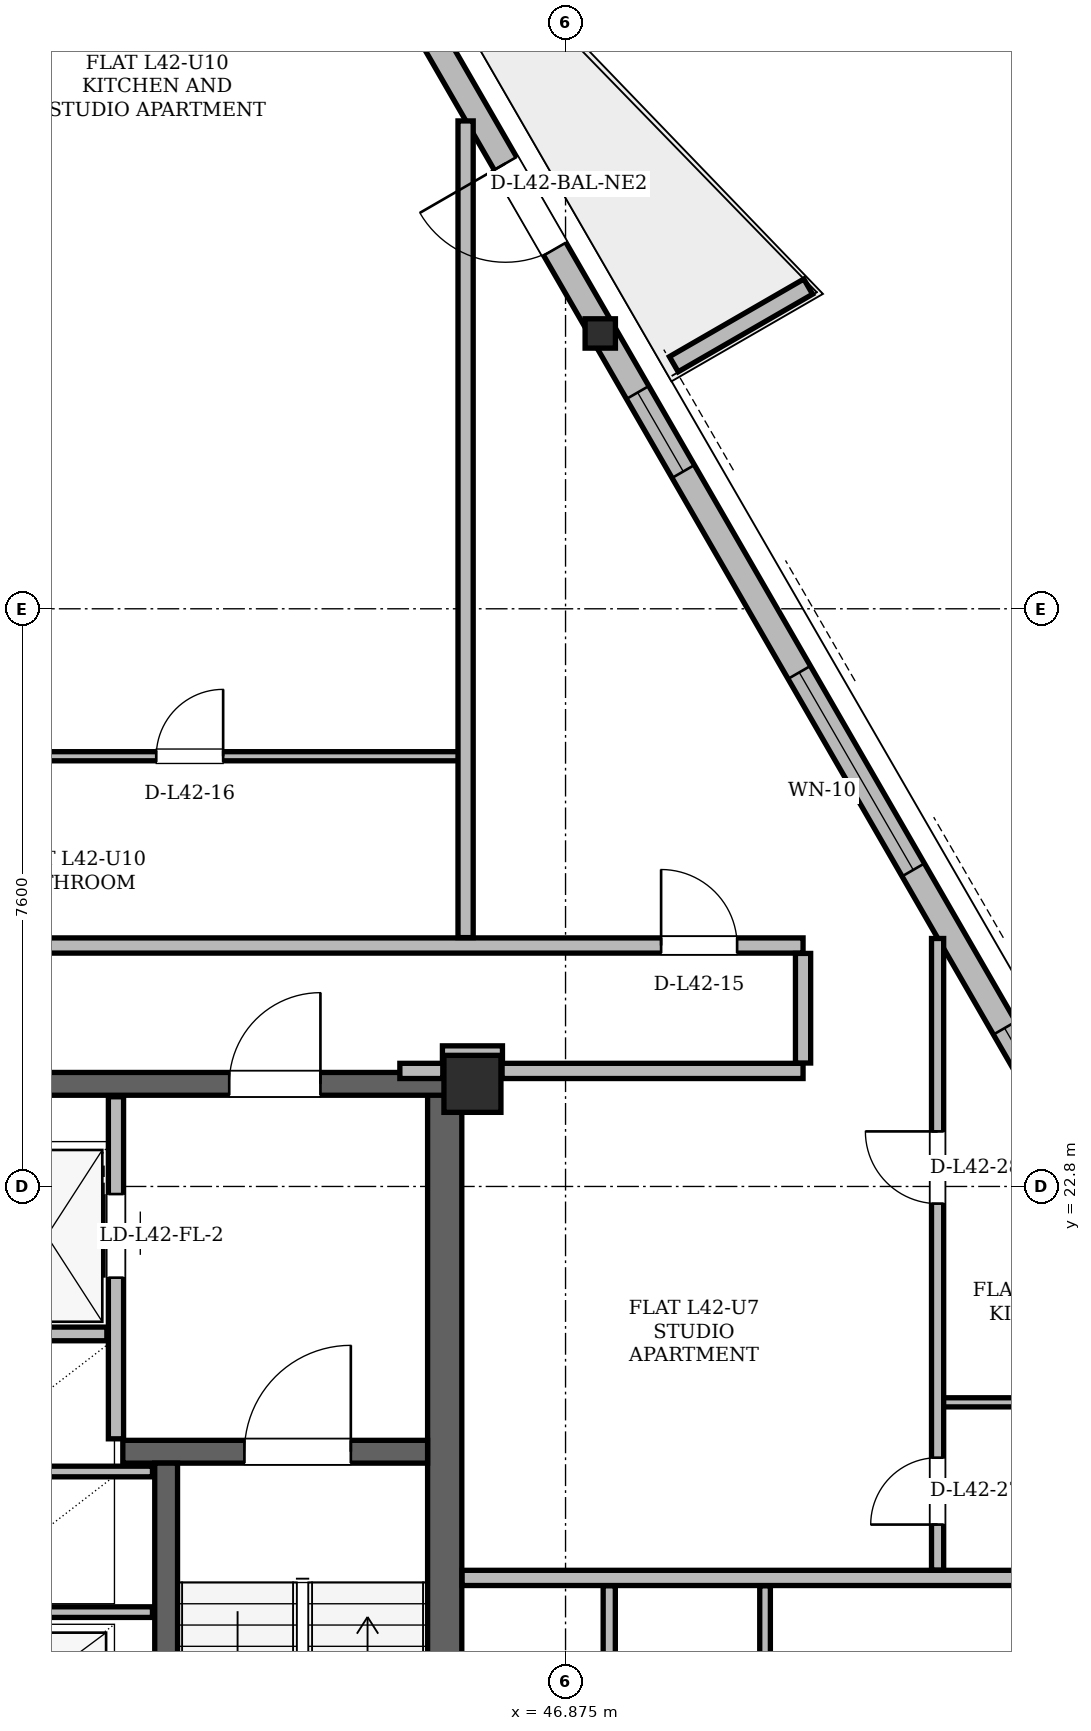
"""IFC4 building model, lengths in metres.
Left out: names, types, materials, properties, quantities, classifications, styles, units other than length and angle.
Written with IfcOpenShell. Run it as: python <this file> out.ifc"""

import sys

from ifc_helpers import new_model, si_unit, direction, frame, frame_2d, origin, origin_2d, place, context, subcontext, project, spatial, polyline, rectangle, hollow_rectangle, i_section, outline, extrude, element, fill, save


model = new_model("IFC4")
c1 = context("Model", 3, precision=1e-05, world=origin(), true_north=direction((0.0, 1.0)))
c2 = subcontext(c1, "Body", "Model", "MODEL_VIEW")
j1 = project(units=[si_unit("LENGTHUNIT", "METRE"), si_unit("PLANEANGLEUNIT", "RADIAN")], contexts=[c1])
p1 = place(None, origin())
s1 = spatial("IfcSite", under=j1, at=p1, CompositionType="ELEMENT")
p2 = place(p1, origin())
s2 = spatial("IfcBuilding", under=s1, at=p2, CompositionType="ELEMENT")
p3 = place(p2, frame((0.0, 0.0, 160.2)))
s3 = spatial("IfcBuildingStorey", under=s2, at=p3, CompositionType="ELEMENT", Elevation=160.2)
p4 = place(p3, frame((45.65, 24.15, 0.0), z_axis=(0.0, 0.0, 1.0), x_axis=(1.0, 0.0, 0.0)))
e1 = element("IfcColumn", 1, at=p4, inside=s3, PredefinedType="COLUMN", context=c2, shape_type="SweptSolid", body=[
    extrude(hollow_rectangle(XDim=0.75, YDim=0.75, WallThickness=0.06, at=origin_2d()), origin(), (0.0, 0.0, 1.0), 3.6),
])
p5 = place(p3, frame((47.368, 34.035, 0.005), z_axis=(-0.019984590736, -0.00734127823, 0.999773335195), x_axis=(0.34481746268, -0.938669759517, 0.0)))
e2 = element("IfcColumn", 2, at=p5, inside=s3, PredefinedType="COLUMN", context=c2, shape_type="SweptSolid", body=[
    extrude(i_section(OverallWidth=0.399, OverallDepth=0.386, WebThickness=0.021, FlangeThickness=0.033, at=origin_2d()), origin(), (0.0, 0.0, 1.0), 3.592),
])
p6 = place(p3, frame((45.285, 11.0, 0.0), z_axis=(0.0, 0.0, 1.0), x_axis=(0.0, 1.0, 0.0)))
e3 = element("IfcWall", 3, at=p6, inside=s3, PredefinedType="SHEAR", context=c2, shape_type="SweptSolid", body=[
    extrude(rectangle(XDim=13.3, YDim=0.45, at=frame_2d((6.65, 0.0))), origin(), (0.0, 0.0, 1.0), 3.38),
])
p7 = place(p3, frame((29.65, 24.15, 0.0), z_axis=(0.0, 0.0, 1.0), x_axis=(1.0, 0.0, 0.0)))
e4 = element("IfcWall", 4, at=p7, inside=s3, PredefinedType="SHEAR", context=c2, shape_type="SweptSolid", body=[
    extrude(rectangle(XDim=15.7, YDim=0.3, at=frame_2d((7.85, 0.0))), origin(), (0.0, 0.0, 1.0), 3.38),
])
p8 = place(p7, frame((1.7, 0.0, 0.0)))
e5 = element("IfcOpeningElement", 5, at=p8, cuts=e4, PredefinedType="OPENING", context=c2, shape_type="SweptSolid", body=[
    extrude(rectangle(XDim=1.2, YDim=2.2, at=frame_2d((0.6, 1.1))), frame((0.0, 0.15, 0.0), z_axis=(0.0, -1.0, 0.0), x_axis=(1.0, 0.0, 0.0)), (0.0, 0.0, 1.0), 0.3),
])
p9 = place(p7, frame((12.8, 0.0, 0.0)))
e6 = element("IfcOpeningElement", 6, at=p9, cuts=e4, PredefinedType="OPENING", context=c2, shape_type="SweptSolid", body=[
    extrude(rectangle(XDim=1.2, YDim=2.2, at=frame_2d((0.6, 1.1))), frame((0.0, 0.15, 0.0), z_axis=(0.0, -1.0, 0.0), x_axis=(1.0, 0.0, 0.0)), (0.0, 0.0, 1.0), 0.3),
])
p10 = place(p7, frame((6.55, 0.0, 0.0)))
e7 = element("IfcOpeningElement", 7, at=p10, cuts=e4, PredefinedType="OPENING", context=c2, shape_type="SweptSolid", body=[
    extrude(rectangle(XDim=0.9, YDim=2.05, at=frame_2d((0.45, 1.025))), frame((0.0, 0.15, 0.0), z_axis=(0.0, -1.0, 0.0), x_axis=(1.0, 0.0, 0.0)), (0.0, 0.0, 1.0), 0.3),
])
p11 = place(p7, frame((8.45, 0.0, 0.0)))
e8 = element("IfcOpeningElement", 8, at=p11, cuts=e4, PredefinedType="OPENING", context=c2, shape_type="SweptSolid", body=[
    extrude(rectangle(XDim=0.9, YDim=2.05, at=frame_2d((0.45, 1.025))), frame((0.0, 0.15, 0.0), z_axis=(0.0, -1.0, 0.0), x_axis=(1.0, 0.0, 0.0)), (0.0, 0.0, 1.0), 0.3),
])
p12 = place(p3, frame((41.05, 19.31, 0.0), z_axis=(0.0, 0.0, 1.0), x_axis=(1.0, 0.0, 0.0)))
e9 = element("IfcWall", 9, at=p12, inside=s3, PredefinedType="SHEAR", context=c2, shape_type="SweptSolid", body=[
    extrude(rectangle(XDim=4.01, YDim=0.3, at=frame_2d((2.005, 0.0))), origin(), (0.0, 0.0, 1.0), 3.38),
])
p13 = place(p12, frame((1.6, 0.0, 0.0)))
e10 = element("IfcOpeningElement", 10, at=p13, cuts=e9, PredefinedType="OPENING", context=c2, shape_type="SweptSolid", body=[
    extrude(rectangle(XDim=1.4, YDim=2.2, at=frame_2d((0.7, 1.1))), frame((0.0, 0.15, 0.0), z_axis=(0.0, -1.0, 0.0), x_axis=(1.0, 0.0, 0.0)), (0.0, 0.0, 1.0), 0.3),
])
p14 = place(p3, frame((41.62, 11.54, 0.0), z_axis=(0.0, 0.0, 1.0), x_axis=(0.0, 1.0, 0.0)))
e11 = element("IfcWall", 11, at=p14, inside=s3, PredefinedType="SHEAR", context=c2, shape_type="SweptSolid", body=[
    extrude(rectangle(XDim=7.62, YDim=0.3, at=frame_2d((3.81, 0.0))), origin(), (0.0, 0.0, 1.0), 3.38),
])
p15 = place(p3, frame((59.853, 12.41, 0.0), z_axis=(0.0, 0.0, 1.0), x_axis=(-0.499995364632, 0.866028079999, 0.0)))
e12 = element("IfcWall", 12, at=p15, inside=s3, PredefinedType="SOLIDWALL", context=c2, shape_type="SweptSolid", body=[
    extrude(rectangle(XDim=35.673, YDim=0.34, at=frame_2d((17.836, 0.0))), origin(), (0.0, 0.0, 1.0), 2.6),
])
p16 = place(p15, frame((6.579, 0.0, 0.0)))
e13 = element("IfcOpeningElement", 13, at=p16, cuts=e12, PredefinedType="OPENING", context=c2, shape_type="SweptSolid", body=[
    extrude(rectangle(XDim=1.5, YDim=2.2, at=frame_2d((0.75, 1.1))), frame((0.0, 0.17, 0.0), z_axis=(0.0, -1.0, 0.0), x_axis=(1.0, 0.0, 0.0)), (0.0, 0.0, 1.0), 0.34),
])
p17 = place(p15, frame((26.238, 0.0, 0.0)))
e14 = element("IfcOpeningElement", 14, at=p17, cuts=e12, PredefinedType="OPENING", context=c2, shape_type="SweptSolid", body=[
    extrude(rectangle(XDim=1.3, YDim=2.2, at=frame_2d((0.65, 1.1))), frame((0.0, 0.17, 0.0), z_axis=(0.0, -1.0, 0.0), x_axis=(1.0, 0.0, 0.0)), (0.0, 0.0, 1.0), 0.34),
])
p18 = place(p15, frame((0.99, 0.0, 0.85)))
e15 = element("IfcOpeningElement", 15, at=p18, cuts=e12, PredefinedType="OPENING", context=c2, shape_type="SweptSolid", body=[
    extrude(rectangle(XDim=1.2, YDim=1.48, at=frame_2d((0.6, 0.74))), frame((0.0, 0.17, 0.0), z_axis=(0.0, -1.0, 0.0), x_axis=(1.0, 0.0, 0.0)), (0.0, 0.0, 1.0), 0.34),
])
p19 = place(p15, frame((2.449, 0.0, 0.85)))
e16 = element("IfcOpeningElement", 16, at=p19, cuts=e12, PredefinedType="OPENING", context=c2, shape_type="SweptSolid", body=[
    extrude(rectangle(XDim=1.2, YDim=1.48, at=frame_2d((0.6, 0.74))), frame((0.0, 0.17, 0.0), z_axis=(0.0, -1.0, 0.0), x_axis=(1.0, 0.0, 0.0)), (0.0, 0.0, 1.0), 0.34),
])
p20 = place(p15, frame((16.807, 0.0, 0.85)))
e17 = element("IfcOpeningElement", 17, at=p20, cuts=e12, PredefinedType="OPENING", context=c2, shape_type="SweptSolid", body=[
    extrude(rectangle(XDim=3.0, YDim=1.64, at=frame_2d((1.5, 0.82))), frame((0.0, 0.17, 0.0), z_axis=(0.0, -1.0, 0.0), x_axis=(1.0, 0.0, 0.0)), (0.0, 0.0, 1.0), 0.34),
])
p21 = place(p15, frame((22.859, 0.0, 0.85)))
e18 = element("IfcOpeningElement", 18, at=p21, cuts=e12, PredefinedType="OPENING", context=c2, shape_type="SweptSolid", body=[
    extrude(rectangle(XDim=1.2, YDim=1.48, at=frame_2d((0.6, 0.74))), frame((0.0, 0.17, 0.0), z_axis=(0.0, -1.0, 0.0), x_axis=(1.0, 0.0, 0.0)), (0.0, 0.0, 1.0), 0.34),
])
p22 = place(p15, frame((13.203, 0.0, 0.85)))
e19 = element("IfcOpeningElement", 19, at=p22, cuts=e12, PredefinedType="OPENING", context=c2, shape_type="SweptSolid", body=[
    extrude(rectangle(XDim=1.2, YDim=1.48, at=frame_2d((0.6, 0.74))), frame((0.0, 0.17, 0.0), z_axis=(0.0, -1.0, 0.0), x_axis=(1.0, 0.0, 0.0)), (0.0, 0.0, 1.0), 0.34),
])
p23 = place(p15, frame((31.37, 0.0, 0.85)))
e20 = element("IfcOpeningElement", 20, at=p23, cuts=e12, PredefinedType="OPENING", context=c2, shape_type="SweptSolid", body=[
    extrude(rectangle(XDim=3.0, YDim=1.64, at=frame_2d((1.5, 0.82))), frame((0.0, 0.17, 0.0), z_axis=(0.0, -1.0, 0.0), x_axis=(1.0, 0.0, 0.0)), (0.0, 0.0, 1.0), 0.34),
])
p24 = place(p3, frame((48.299, 33.618, 0.0), z_axis=(0.0, 0.0, 1.0), x_axis=(0.866042246008, 0.499970827278, 0.0)))
e21 = element("IfcWall", 21, at=p24, inside=s3, PredefinedType="PARAPET", context=c2, shape_type="SweptSolid", body=[
    extrude(outline(polyline([(0.0, 0.0), (2.042, 0.0), (2.042, 1.1), (0.0, 1.32), (0.0, 0.0)])), frame((0.0, 0.115, 0.0), z_axis=(0.0, -1.0, 0.0), x_axis=(1.0, 0.0, 0.0)), (0.0, 0.0, 1.0), 0.23),
])
p25 = place(p3, frame((40.96, 19.48, 0.0), z_axis=(0.0, 0.0, 1.0), x_axis=(0.0, 1.0, 0.0)))
e22 = element("IfcWall", 22, at=p25, inside=s3, PredefinedType="PARTITIONING", context=c2, shape_type="SweptSolid", body=[
    extrude(rectangle(XDim=4.5, YDim=0.2, at=frame_2d((2.25, 0.0))), origin(), (0.0, 0.0, 1.0), 2.42),
])
p26 = place(p25, frame((2.12, 0.0, 0.0)))
e23 = element("IfcOpeningElement", 23, at=p26, cuts=e22, PredefinedType="OPENING", context=c2, shape_type="SweptSolid", body=[
    extrude(rectangle(XDim=1.1, YDim=2.2, at=frame_2d((0.55, 1.1))), frame((0.0, 0.1, 0.0), z_axis=(0.0, -1.0, 0.0), x_axis=(1.0, 0.0, 0.0)), (0.0, 0.0, 1.0), 0.2),
])
p27 = place(p3, frame((39.26, 20.86, 0.0), z_axis=(0.0, 0.0, 1.0), x_axis=(1.0, 0.0, 0.0)))
e24 = element("IfcWall", 24, at=p27, inside=s3, PredefinedType="PARTITIONING", context=c2, shape_type="SweptSolid", body=[
    extrude(rectangle(XDim=1.58, YDim=0.18, at=frame_2d((0.79, 0.0))), origin(), (0.0, 0.0, 1.0), 3.38),
])
for number, where, z_axis, x_axis in (
    (25, (38.78, 17.2, 0.0), (0.0, 0.0, 1.0), (1.0, 0.0, 0.0)),
    (26, (38.78, 19.05, 0.0), (0.0, 0.0, 1.0), (1.0, 0.0, 0.0)),
):
    element("IfcWall", number, at=place(p3, frame(where, z_axis=z_axis, x_axis=x_axis)), inside=s3, PredefinedType="PARTITIONING", context=c2, shape_type="SweptSolid", body=[
        extrude(rectangle(XDim=2.66, YDim=0.14, at=frame_2d((1.33, 0.0))), origin(), (0.0, 0.0, 1.0), 3.38),
    ])
p28 = place(p3, frame((45.514, 17.65, 0.0), z_axis=(0.0, 0.0, 1.0), x_axis=(1.0, 0.0, 0.0)))
e27 = element("IfcWall", 27, at=p28, inside=s3, PredefinedType="PARTITIONING", context=c2, shape_type="SweptSolid", body=[
    extrude(rectangle(XDim=11.113, YDim=0.2, at=frame_2d((5.557, 0.0))), origin(), (0.0, 0.0, 1.0), 2.42),
])
p29 = place(p3, frame((51.773, 19.96, 0.0), z_axis=(0.0, 0.0, 1.0), x_axis=(1.0, 0.0, 0.0)))
e28 = element("IfcWall", 28, at=p29, inside=s3, PredefinedType="PARTITIONING", context=c2, shape_type="SweptSolid", body=[
    extrude(rectangle(XDim=3.52, YDim=0.12, at=frame_2d((1.76, 0.0))), origin(), (0.0, 0.0, 1.0), 3.38),
])
p30 = place(p3, frame((44.695, 24.32, 0.0), z_axis=(0.0, 0.0, 1.0), x_axis=(1.0, 0.0, 0.0)))
e29 = element("IfcWall", 29, at=p30, inside=s3, PredefinedType="PARTITIONING", context=c2, shape_type="SweptSolid", body=[
    extrude(rectangle(XDim=0.565, YDim=0.2, at=frame_2d((0.282, 0.0))), origin(), (0.0, 0.0, 1.0), 2.42),
])
p31 = place(p3, frame((46.04, 24.32, 0.0), z_axis=(0.0, 0.0, 1.0), x_axis=(1.0, 0.0, 0.0)))
e30 = element("IfcWall", 30, at=p31, inside=s3, PredefinedType="PARTITIONING", context=c2, shape_type="SweptSolid", body=[
    extrude(rectangle(XDim=3.96, YDim=0.2, at=frame_2d((1.98, 0.0))), origin(), (0.0, 0.0, 1.0), 3.38),
])
p32 = place(p3, frame((45.255, 24.55, 0.0), z_axis=(0.0, 0.0, 1.0), x_axis=(1.0, 0.0, 0.0)))
e31 = element("IfcWall", 31, at=p32, inside=s3, PredefinedType="PARTITIONING", context=c2, shape_type="SweptSolid", body=[
    extrude(rectangle(XDim=0.79, YDim=0.2, at=frame_2d((0.395, 0.0))), origin(), (0.0, 0.0, 1.0), 2.842),
])
p33 = place(p3, frame((38.3, 25.97, 0.0), z_axis=(0.0, 0.0, 1.0), x_axis=(1.0, 0.0, 0.0)))
e32 = element("IfcWall", 32, at=p33, inside=s3, PredefinedType="PARTITIONING", context=c2, shape_type="SweptSolid", body=[
    extrude(rectangle(XDim=11.7, YDim=0.2, at=frame_2d((5.85, 0.0))), origin(), (0.0, 0.0, 1.0), 2.842),
])
p34 = place(p33, frame((9.832, 0.0, 0.0)))
e33 = element("IfcOpeningElement", 33, at=p34, cuts=e32, PredefinedType="OPENING", context=c2, shape_type="SweptSolid", body=[
    extrude(rectangle(XDim=1.0, YDim=2.18, at=frame_2d((0.5, 1.09))), frame((0.0, 0.1, 0.0), z_axis=(0.0, -1.0, 0.0), x_axis=(1.0, 0.0, 0.0)), (0.0, 0.0, 1.0), 0.2),
])
p35 = place(p3, frame((38.218, 28.46, 0.0), z_axis=(0.0, 0.0, 1.0), x_axis=(1.0, 0.0, 0.0)))
e34 = element("IfcWall", 34, at=p35, inside=s3, PredefinedType="PARTITIONING", context=c2, shape_type="SweptSolid", body=[
    extrude(rectangle(XDim=7.424, YDim=0.12, at=frame_2d((3.712, 0.0))), origin(), (0.0, 0.0, 1.0), 3.38),
])
p36 = place(p35, frame((3.272, 0.0, 0.0)))
e35 = element("IfcOpeningElement", 35, at=p36, cuts=e34, PredefinedType="OPENING", context=c2, shape_type="SweptSolid", body=[
    extrude(rectangle(XDim=0.88, YDim=2.08, at=frame_2d((0.44, 1.04))), frame((0.0, 0.06, 0.0), z_axis=(0.0, -1.0, 0.0), x_axis=(1.0, 0.0, 0.0)), (0.0, 0.0, 1.0), 0.12),
])
p37 = place(p3, frame((45.56, 26.074, 0.0), z_axis=(0.0, 0.0, 1.0), x_axis=(0.0, 1.0, 0.0)))
e36 = element("IfcWall", 36, at=p37, inside=s3, PredefinedType="PARTITIONING", context=c2, shape_type="SweptSolid", body=[
    extrude(rectangle(XDim=10.744, YDim=0.2, at=frame_2d((5.372, 0.0))), origin(), (0.0, 0.0, 1.0), 3.38),
])
p38 = place(p3, frame((47.45, 13.074, 0.0), z_axis=(0.0, 0.0, 1.0), x_axis=(0.0, 1.0, 0.0)))
e37 = element("IfcWall", 37, at=p38, inside=s3, PredefinedType="PARTITIONING", context=c2, shape_type="SweptSolid", body=[
    extrude(rectangle(XDim=4.472, YDim=0.16, at=frame_2d((2.236, 0.0))), origin(), (0.0, 0.0, 1.0), 3.38),
])
p39 = place(p3, frame((49.5, 13.074, 0.0), z_axis=(0.0, 0.0, 1.0), x_axis=(0.0, 1.0, 0.0)))
e38 = element("IfcWall", 38, at=p39, inside=s3, PredefinedType="PARTITIONING", context=c2, shape_type="SweptSolid", body=[
    extrude(rectangle(XDim=4.472, YDim=0.14, at=frame_2d((2.236, 0.0))), origin(), (0.0, 0.0, 1.0), 3.38),
])
p40 = place(p3, frame((50.0, 24.424, 0.0), z_axis=(0.0, 0.0, 1.0), x_axis=(0.0, 1.0, 0.0)))
e39 = element("IfcWall", 39, at=p40, inside=s3, PredefinedType="PARTITIONING", context=c2, shape_type="SweptSolid", body=[
    extrude(rectangle(XDim=1.442, YDim=0.2, at=frame_2d((0.721, 0.0))), origin(), (0.0, 0.0, 1.0), 3.38),
])
p41 = place(p3, frame((51.77, 17.754, 0.0), z_axis=(0.0, 0.0, 1.0), x_axis=(0.0, 1.0, 0.0)))
e40 = element("IfcWall", 40, at=p41, inside=s3, PredefinedType="PARTITIONING", context=c2, shape_type="SweptSolid", body=[
    extrude(rectangle(XDim=8.308, YDim=0.16, at=frame_2d((4.154, 0.0))), origin(), (0.0, 0.0, 1.0), 3.38),
])
p42 = place(p41, frame((0.598, 0.0, 0.0)))
e41 = element("IfcOpeningElement", 41, at=p42, cuts=e40, PredefinedType="OPENING", context=c2, shape_type="SweptSolid", body=[
    extrude(rectangle(XDim=0.88, YDim=2.08, at=frame_2d((0.44, 1.04))), frame((0.0, 0.08, 0.0), z_axis=(0.0, -1.0, 0.0), x_axis=(1.0, 0.0, 0.0)), (0.0, 0.0, 1.0), 0.16),
])
p43 = place(p41, frame((4.82, 0.0, 0.0)))
e42 = element("IfcOpeningElement", 42, at=p43, cuts=e40, PredefinedType="OPENING", context=c2, shape_type="SweptSolid", body=[
    extrude(rectangle(XDim=0.95, YDim=2.1, at=frame_2d((0.475, 1.05))), frame((0.0, 0.08, 0.0), z_axis=(0.0, -1.0, 0.0), x_axis=(1.0, 0.0, 0.0)), (0.0, 0.0, 1.0), 0.16),
])
p44 = place(p17, origin())
e43 = element("IfcDoor", 43, at=p44, inside=s3, OperationType="SINGLE_SWING_RIGHT", PredefinedType="DOOR", context=c2, shape_type="SweptSolid", body=[
    extrude(rectangle(XDim=1.3, YDim=2.2, at=frame_2d((0.65, 1.1))), frame((0.0, 0.025, 0.0), z_axis=(0.0, -1.0, 0.0), x_axis=(1.0, 0.0, 0.0)), (0.0, 0.0, 1.0), 0.05),
])
fill(e14, e43)
p45 = place(p20, origin())
e44 = element("IfcWindow", 44, at=p45, inside=s3, PartitioningType="SINGLE_PANEL", PredefinedType="WINDOW", context=c2, shape_type="SweptSolid", body=[
    extrude(rectangle(XDim=3.0, YDim=1.64, at=frame_2d((1.5, 0.82))), frame((0.0, 0.03, 0.0), z_axis=(0.0, -1.0, 0.0), x_axis=(1.0, 0.0, 0.0)), (0.0, 0.0, 1.0), 0.06),
])
fill(e17, e44)
p46 = place(p21, origin())
e45 = element("IfcWindow", 45, at=p46, inside=s3, PartitioningType="SINGLE_PANEL", PredefinedType="WINDOW", context=c2, shape_type="SweptSolid", body=[
    extrude(rectangle(XDim=1.2, YDim=1.48, at=frame_2d((0.6, 0.74))), frame((0.0, 0.03, 0.0), z_axis=(0.0, -1.0, 0.0), x_axis=(1.0, 0.0, 0.0)), (0.0, 0.0, 1.0), 0.06),
])
fill(e18, e45)
p47 = place(p22, origin())
e46 = element("IfcWindow", 46, at=p47, inside=s3, PartitioningType="SINGLE_PANEL", PredefinedType="WINDOW", context=c2, shape_type="SweptSolid", body=[
    extrude(rectangle(XDim=1.2, YDim=1.48, at=frame_2d((0.6, 0.74))), frame((0.0, 0.03, 0.0), z_axis=(0.0, -1.0, 0.0), x_axis=(1.0, 0.0, 0.0)), (0.0, 0.0, 1.0), 0.06),
])
fill(e19, e46)
p48 = place(p26, origin())
e47 = element("IfcDoor", 47, at=p48, inside=s3, OperationType="SLIDING_TO_RIGHT", PredefinedType="DOOR", context=c2, shape_type="SweptSolid", body=[
    extrude(rectangle(XDim=1.1, YDim=2.2, at=frame_2d((0.55, 1.1))), frame((0.0, 0.025, 0.0), z_axis=(0.0, -1.0, 0.0), x_axis=(1.0, 0.0, 0.0)), (0.0, 0.0, 1.0), 0.05),
])
fill(e23, e47)
p49 = place(p13, origin())
e48 = element("IfcDoor", 48, at=p49, inside=s3, OperationType="SINGLE_SWING_RIGHT", PredefinedType="DOOR", context=c2, shape_type="SweptSolid", body=[
    extrude(rectangle(XDim=1.4, YDim=2.2, at=frame_2d((0.7, 1.1))), frame((0.0, 0.025, 0.0), z_axis=(0.0, -1.0, 0.0), x_axis=(1.0, 0.0, 0.0)), (0.0, 0.0, 1.0), 0.05),
])
fill(e10, e48)
p50 = place(p9, origin())
e49 = element("IfcDoor", 49, at=p50, inside=s3, OperationType="SINGLE_SWING_RIGHT", PredefinedType="DOOR", context=c2, shape_type="SweptSolid", body=[
    extrude(rectangle(XDim=1.2, YDim=2.2, at=frame_2d((0.6, 1.1))), frame((0.0, 0.025, 0.0), z_axis=(0.0, -1.0, 0.0), x_axis=(1.0, 0.0, 0.0)), (0.0, 0.0, 1.0), 0.05),
])
fill(e6, e49)
p51 = place(p34, origin())
e50 = element("IfcDoor", 50, at=p51, inside=s3, OperationType="SINGLE_SWING_LEFT", PredefinedType="DOOR", context=c2, shape_type="SweptSolid", body=[
    extrude(rectangle(XDim=1.0, YDim=2.18, at=frame_2d((0.5, 1.09))), frame((0.0, 0.025, 0.0), z_axis=(0.0, -1.0, 0.0), x_axis=(1.0, 0.0, 0.0)), (0.0, 0.0, 1.0), 0.05),
])
fill(e33, e50)
p52 = place(p36, origin())
e51 = element("IfcDoor", 51, at=p52, inside=s3, OperationType="SINGLE_SWING_RIGHT", PredefinedType="DOOR", context=c2, shape_type="SweptSolid", body=[
    extrude(rectangle(XDim=0.88, YDim=2.08, at=frame_2d((0.44, 1.04))), frame((0.0, 0.025, 0.0), z_axis=(0.0, -1.0, 0.0), x_axis=(1.0, 0.0, 0.0)), (0.0, 0.0, 1.0), 0.05),
])
fill(e35, e51)
p53 = place(p42, origin())
e52 = element("IfcDoor", 52, at=p53, inside=s3, OperationType="SINGLE_SWING_LEFT", PredefinedType="DOOR", context=c2, shape_type="SweptSolid", body=[
    extrude(rectangle(XDim=0.88, YDim=2.08, at=frame_2d((0.44, 1.04))), frame((0.0, 0.025, 0.0), z_axis=(0.0, -1.0, 0.0), x_axis=(1.0, 0.0, 0.0)), (0.0, 0.0, 1.0), 0.05),
])
fill(e41, e52)
p54 = place(p43, origin())
e53 = element("IfcDoor", 53, at=p54, inside=s3, OperationType="SINGLE_SWING_RIGHT", PredefinedType="DOOR", context=c2, shape_type="SweptSolid", body=[
    extrude(rectangle(XDim=0.95, YDim=2.1, at=frame_2d((0.475, 1.05))), frame((0.0, 0.025, 0.0), z_axis=(0.0, -1.0, 0.0), x_axis=(1.0, 0.0, 0.0)), (0.0, 0.0, 1.0), 0.05),
])
fill(e42, e53)
save(model, sys.argv[1])
